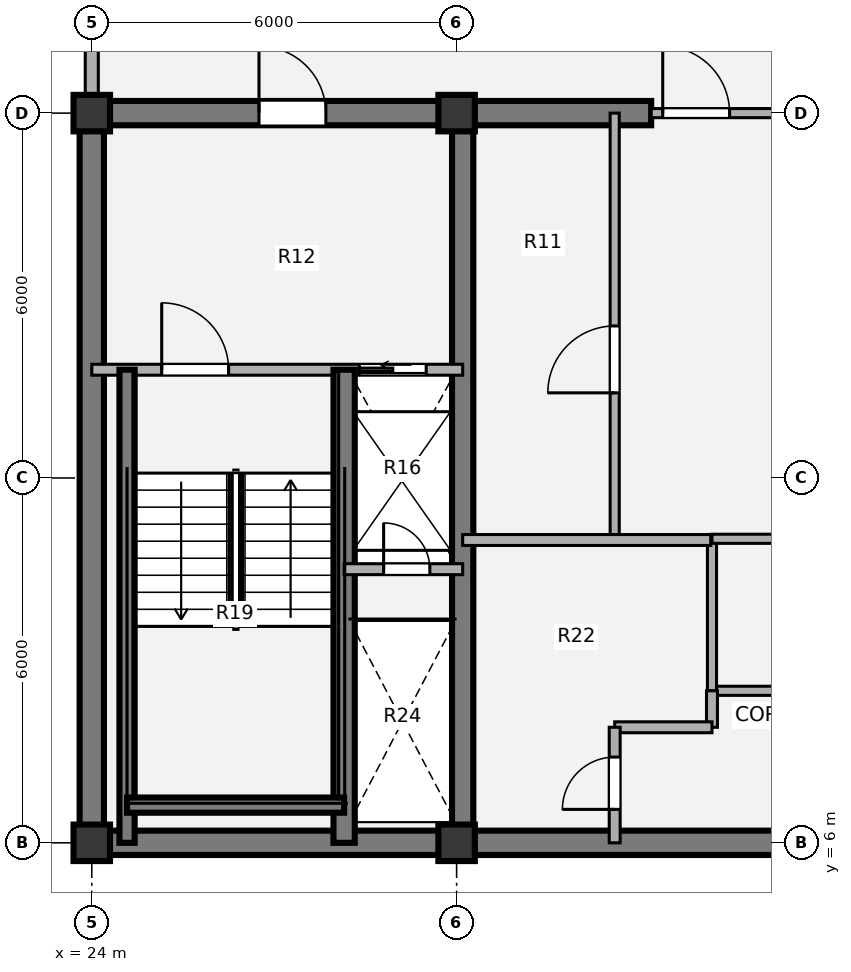
"""IFC4 building model, lengths in metres.
Left out: names, types, materials, properties, quantities, classifications, styles, units other than length and angle.
Written with IfcOpenShell. Run it as: python <this file> out.ifc"""

import sys

from ifc_helpers import new_model, si_unit, direction, frame, frame_2d, origin, origin_2d, place, context, subcontext, project, spatial, rectangle, extrude, source, transform, mapped, element, fill, save


model = new_model("IFC4")
c1 = context("Model", 3, precision=1e-05, world=origin(), true_north=direction((0.0, 1.0)))
c2 = subcontext(c1, "Body", "Model", "MODEL_VIEW")
j1 = project(units=[si_unit("LENGTHUNIT", "METRE"), si_unit("PLANEANGLEUNIT", "RADIAN")], contexts=[c1])
p1 = place(None, origin())
s1 = spatial("IfcSite", under=j1, at=p1, CompositionType="ELEMENT")
p2 = place(p1, origin())
s2 = spatial("IfcBuilding", under=s1, at=p2, CompositionType="ELEMENT")
p3 = place(p2, frame((0.0, 0.0, 253.26)))
s3 = spatial("IfcBuildingStorey", under=s2, at=p3, CompositionType="ELEMENT", Elevation=253.26)
m1 = source(origin(), c2, "Body", "SweptSolid", [
    extrude(rectangle(XDim=0.6, YDim=0.6, at=origin_2d()), origin(), (0.0, 0.0, 1.0), 3.78),
])
for number, where, z_axis, x_axis in (
    (1, (24.0, 6.0, 0.0), (0.0, 0.0, 1.0), (1.0, 0.0, 0.0)),
    (2, (30.0, 6.0, 0.0), (0.0, 0.0, 1.0), (1.0, 0.0, 0.0)),
    (3, (24.0, 18.0, 0.0), (0.0, 0.0, 1.0), (1.0, 0.0, 0.0)),
    (4, (30.0, 18.0, 0.0), (0.0, 0.0, 1.0), (1.0, 0.0, 0.0)),
):
    element("IfcColumn", number, at=place(p3, frame(where, z_axis=z_axis, x_axis=x_axis)), inside=s3, PredefinedType="COLUMN", context=c2, shape_type="MappedRepresentation", body=[
        mapped(m1, transform((0.0, 0.0, 0.0), x_axis=(1.0, 0.0, 0.0), y_axis=(0.0, 1.0, 0.0), z_axis=(0.0, 0.0, 1.0), scale=1.0)),
    ])
p4 = place(p3, frame((48.2, 6.0, 0.0), z_axis=(0.0, 0.0, 1.0), x_axis=(-1.0, 0.0, 0.0)))
e5 = element("IfcWall", 5, at=p4, inside=s3, PredefinedType="SHEAR", context=c2, shape_type="SweptSolid", body=[
    extrude(rectangle(XDim=24.4, YDim=0.4, at=frame_2d((12.2, 0.0))), origin(), (0.0, 0.0, 1.0), 3.78),
])
p5 = place(p3, frame((24.0, 6.0, 0.0), z_axis=(0.0, 0.0, 1.0), x_axis=(0.0, 1.0, 0.0)))
e6 = element("IfcWall", 6, at=p5, inside=s3, PredefinedType="SHEAR", context=c2, shape_type="SweptSolid", body=[
    extrude(rectangle(XDim=12.0, YDim=0.4, at=frame_2d((6.0, 0.0))), origin(), (0.0, 0.0, 1.0), 3.78),
])
p6 = place(p3, frame((23.8, 18.0, 0.0), z_axis=(0.0, 0.0, 1.0), x_axis=(1.0, 0.0, 0.0)))
e7 = element("IfcWall", 7, at=p6, inside=s3, PredefinedType="SHEAR", context=c2, shape_type="SweptSolid", body=[
    extrude(rectangle(XDim=9.4, YDim=0.4, at=frame_2d((4.7, 0.0))), origin(), (0.0, 0.0, 1.0), 3.78),
])
p7 = place(p6, frame((2.95, 0.0, 0.0)))
e8 = element("IfcOpeningElement", 8, at=p7, cuts=e7, PredefinedType="OPENING", context=c2, shape_type="SweptSolid", body=[
    extrude(rectangle(XDim=1.1, YDim=2.1, at=origin_2d()), frame((0.55, 0.21, 1.05), z_axis=(0.0, -1.0, 0.0), x_axis=(1.0, 0.0, 0.0)), (0.0, 0.0, 1.0), 0.42),
])
p8 = place(p3, frame((30.1, 6.0, 0.0), z_axis=(0.0, 0.0, 1.0), x_axis=(0.0, 1.0, 0.0)))
e9 = element("IfcWall", 9, at=p8, inside=s3, PredefinedType="SHEAR", context=c2, shape_type="SweptSolid", body=[
    extrude(rectangle(XDim=12.0, YDim=0.35, at=frame_2d((6.0, 0.0))), origin(), (0.0, 0.0, 1.0), 3.78),
])
p9 = place(p3, frame((24.0, 18.28, 0.0), z_axis=(0.0, 0.0, 1.0), x_axis=(0.0, 1.0, 0.0)))
e10 = element("IfcWall", 10, at=p9, inside=s3, PredefinedType="SOLIDWALL", context=c2, shape_type="SweptSolid", body=[
    extrude(rectangle(XDim=2.77, YDim=0.215, at=frame_2d((1.385, 0.0))), origin(), (0.0, 0.0, 1.0), 2.718),
])
p10 = place(p3, frame((32.6, 11.0, 0.0), z_axis=(0.0, 0.0, 1.0), x_axis=(0.0, 1.0, 0.0)))
e11 = element("IfcWall", 11, at=p10, inside=s3, PredefinedType="PARTITIONING", context=c2, shape_type="SweptSolid", body=[
    extrude(rectangle(XDim=7.0, YDim=0.15, at=frame_2d((3.5, 0.0))), origin(), (0.0, 0.0, 1.0), 3.5),
])
p11 = place(p10, frame((2.4, 0.0, 0.0)))
e12 = element("IfcOpeningElement", 12, at=p11, cuts=e11, PredefinedType="OPENING", context=c2, shape_type="SweptSolid", body=[
    extrude(rectangle(XDim=1.1, YDim=2.1, at=origin_2d()), frame((0.55, 0.085, 1.05), z_axis=(0.0, -1.0, 0.0), x_axis=(1.0, 0.0, 0.0)), (0.0, 0.0, 1.0), 0.17),
])
p12 = place(p3, frame((34.2, 8.5, 0.0), z_axis=(0.0, 0.0, 1.0), x_axis=(1.0, 0.0, 0.0)))
e13 = element("IfcWall", 13, at=p12, inside=s3, PredefinedType="PARTITIONING", context=c2, shape_type="SweptSolid", body=[
    extrude(rectangle(XDim=5.15, YDim=0.15, at=frame_2d((2.575, 0.0))), origin(), (0.0, 0.0, 1.0), 3.5),
])
p13 = place(p3, frame((34.2, 8.5, 0.0), z_axis=(0.0, 0.0, 1.0), x_axis=(0.0, 1.0, 0.0)))
e14 = element("IfcWall", 14, at=p13, inside=s3, PredefinedType="PARTITIONING", context=c2, shape_type="SweptSolid", body=[
    extrude(rectangle(XDim=2.5, YDim=0.15, at=frame_2d((1.25, 0.0))), origin(), (0.0, 0.0, 1.0), 3.5),
])
p14 = place(p3, frame((34.2, 11.0, 0.0), z_axis=(0.0, 0.0, 1.0), x_axis=(1.0, 0.0, 0.0)))
e15 = element("IfcWall", 15, at=p14, inside=s3, PredefinedType="PARTITIONING", context=c2, shape_type="SweptSolid", body=[
    extrude(rectangle(XDim=5.15, YDim=0.15, at=frame_2d((2.575, 0.0))), origin(), (0.0, 0.0, 1.0), 3.5),
])
p15 = place(p14, frame((2.0, 0.0, 0.0)))
e16 = element("IfcOpeningElement", 16, at=p15, cuts=e15, PredefinedType="OPENING", context=c2, shape_type="SweptSolid", body=[
    extrude(rectangle(XDim=1.1, YDim=2.1, at=origin_2d()), frame((0.55, 0.085, 1.05), z_axis=(0.0, -1.0, 0.0), x_axis=(1.0, 0.0, 0.0)), (0.0, 0.0, 1.0), 0.17),
])
p16 = place(p3, frame((30.1, 10.98, 0.0), z_axis=(0.0, 0.0, 1.0), x_axis=(1.0, 0.0, 0.0)))
e17 = element("IfcWall", 17, at=p16, inside=s3, PredefinedType="PARTITIONING", context=c2, shape_type="SweptSolid", body=[
    extrude(rectangle(XDim=4.08, YDim=0.18, at=frame_2d((2.04, 0.0))), origin(), (0.0, 0.0, 1.0), 3.5),
])
p17 = place(p3, frame((34.2, 7.9, 0.0), z_axis=(0.0, 0.0, 1.0), x_axis=(0.0, 1.0, 0.0)))
e18 = element("IfcWall", 18, at=p17, inside=s3, PredefinedType="PARTITIONING", context=c2, shape_type="SweptSolid", body=[
    extrude(rectangle(XDim=0.6, YDim=0.18, at=frame_2d((0.3, 0.0))), origin(), (0.0, 0.0, 1.0), 3.5),
])
p18 = place(p3, frame((32.6, 7.9, 0.0), z_axis=(0.0, 0.0, 1.0), x_axis=(1.0, 0.0, 0.0)))
e19 = element("IfcWall", 19, at=p18, inside=s3, PredefinedType="PARTITIONING", context=c2, shape_type="SweptSolid", body=[
    extrude(rectangle(XDim=1.6, YDim=0.18, at=frame_2d((0.8, 0.0))), origin(), (0.0, 0.0, 1.0), 3.5),
])
p19 = place(p3, frame((32.6, 6.0, 0.0), z_axis=(0.0, 0.0, 1.0), x_axis=(0.0, 1.0, 0.0)))
e20 = element("IfcWall", 20, at=p19, inside=s3, PredefinedType="PARTITIONING", context=c2, shape_type="SweptSolid", body=[
    extrude(rectangle(XDim=1.9, YDim=0.18, at=frame_2d((0.95, 0.0))), origin(), (0.0, 0.0, 1.0), 3.5),
])
p20 = place(p19, frame((0.55, 0.0, 0.0)))
e21 = element("IfcOpeningElement", 21, at=p20, cuts=e20, PredefinedType="OPENING", context=c2, shape_type="SweptSolid", body=[
    extrude(rectangle(XDim=0.86, YDim=2.1, at=origin_2d()), frame((0.43, 0.1, 1.05), z_axis=(0.0, -1.0, 0.0), x_axis=(1.0, 0.0, 0.0)), (0.0, 0.0, 1.0), 0.2),
])
p21 = place(p3, frame((33.2, 18.0, 0.0), z_axis=(0.0, 0.0, 1.0), x_axis=(1.0, 0.0, 0.0)))
e22 = element("IfcWall", 22, at=p21, inside=s3, PredefinedType="PARTITIONING", context=c2, shape_type="SweptSolid", body=[
    extrude(rectangle(XDim=5.6, YDim=0.15, at=frame_2d((2.8, 0.0))), origin(), (0.0, 0.0, 1.0), 2.515),
])
p22 = place(p21, frame((0.19, 0.0, 0.0)))
e23 = element("IfcOpeningElement", 23, at=p22, cuts=e22, PredefinedType="OPENING", context=c2, shape_type="SweptSolid", body=[
    extrude(rectangle(XDim=1.1, YDim=2.1, at=origin_2d()), frame((0.55, 0.085, 1.05), z_axis=(0.0, -1.0, 0.0), x_axis=(1.0, 0.0, 0.0)), (0.0, 0.0, 1.0), 0.17),
])
p23 = place(p21, frame((4.31, 0.0, 0.0)))
e24 = element("IfcOpeningElement", 24, at=p23, cuts=e22, PredefinedType="OPENING", context=c2, shape_type="SweptSolid", body=[
    extrude(rectangle(XDim=1.1, YDim=2.1, at=origin_2d()), frame((0.55, 0.085, 1.05), z_axis=(0.0, -1.0, 0.0), x_axis=(1.0, 0.0, 0.0)), (0.0, 0.0, 1.0), 0.17),
])
p24 = place(p3, frame((24.0, 13.78, 0.0), z_axis=(0.0, 0.0, 1.0), x_axis=(1.0, 0.0, 0.0)))
e25 = element("IfcWall", 25, at=p24, inside=s3, PredefinedType="PARTITIONING", context=c2, shape_type="SweptSolid", body=[
    extrude(rectangle(XDim=6.1, YDim=0.18, at=frame_2d((3.05, 0.0))), origin(), (0.0, 0.0, 1.0), 3.5),
])
p25 = place(p24, frame((1.15, 0.0, 0.0)))
e26 = element("IfcOpeningElement", 26, at=p25, cuts=e25, PredefinedType="OPENING", context=c2, shape_type="SweptSolid", body=[
    extrude(rectangle(XDim=1.1, YDim=2.1, at=origin_2d()), frame((0.55, 0.1, 1.05), z_axis=(0.0, -1.0, 0.0), x_axis=(1.0, 0.0, 0.0)), (0.0, 0.0, 1.0), 0.2),
])
p26 = place(p24, frame((4.4, 0.0, 0.0)))
e27 = element("IfcOpeningElement", 27, at=p26, cuts=e25, PredefinedType="OPENING", context=c2, shape_type="SweptSolid", body=[
    extrude(rectangle(XDim=1.1, YDim=2.1, at=origin_2d()), frame((0.55, 0.1, 1.05), z_axis=(0.0, -1.0, 0.0), x_axis=(1.0, 0.0, 0.0)), (0.0, 0.0, 1.0), 0.2),
])
p27 = place(p3, frame((28.15, 6.0, 0.0), z_axis=(0.0, 0.0, 1.0), x_axis=(0.0, 1.0, 0.0)))
e28 = element("IfcWall", 28, at=p27, inside=s3, PredefinedType="SHEAR", context=c2, shape_type="SweptSolid", body=[
    extrude(rectangle(XDim=7.78, YDim=0.35, at=frame_2d((3.89, 0.0))), origin(), (0.0, 0.0, 1.0), 3.85),
])
p28 = place(p3, frame((24.58, 6.0, 0.0), z_axis=(0.0, 0.0, 1.0), x_axis=(0.0, 1.0, 0.0)))
e29 = element("IfcWall", 29, at=p28, inside=s3, PredefinedType="SHEAR", context=c2, shape_type="SweptSolid", body=[
    extrude(rectangle(XDim=7.78, YDim=0.25, at=frame_2d((3.89, 0.0))), origin(), (0.0, 0.0, 1.0), 3.85),
])
p29 = place(p3, frame((24.58, 6.62, 0.0), z_axis=(0.0, 0.0, 1.0), x_axis=(1.0, 0.0, 0.0)))
e30 = element("IfcWall", 30, at=p29, inside=s3, PredefinedType="SHEAR", context=c2, shape_type="SweptSolid", body=[
    extrude(rectangle(XDim=3.57, YDim=0.25, at=frame_2d((1.785, 0.0))), origin(), (0.0, 0.0, 1.0), 3.85),
])
p30 = place(p3, frame((28.15, 10.5, 0.0), z_axis=(0.0, 0.0, 1.0), x_axis=(1.0, 0.0, 0.0)))
e31 = element("IfcWall", 31, at=p30, inside=s3, PredefinedType="PARTITIONING", context=c2, shape_type="SweptSolid", body=[
    extrude(rectangle(XDim=1.95, YDim=0.18, at=frame_2d((0.975, 0.0))), origin(), (0.0, 0.0, 1.0), 3.5),
])
p31 = place(p30, frame((0.65, 0.0, 0.0)))
e32 = element("IfcOpeningElement", 32, at=p31, cuts=e31, PredefinedType="OPENING", context=c2, shape_type="SweptSolid", body=[
    extrude(rectangle(XDim=0.76, YDim=2.05, at=origin_2d()), frame((0.38, 0.1, 1.025), z_axis=(0.0, -1.0, 0.0), x_axis=(1.0, 0.0, 0.0)), (0.0, 0.0, 1.0), 0.2),
])
m2 = source(origin(), c2, "Body", "SweptSolid", [
    extrude(rectangle(XDim=1.1, YDim=2.1, at=origin_2d()), frame((0.55, 0.025, 1.05), z_axis=(0.0, -1.0, 0.0), x_axis=(1.0, 0.0, 0.0)), (0.0, 0.0, 1.0), 0.05),
])
p32 = place(p11, origin())
e33 = element("IfcDoor", 33, at=p32, inside=s3, OperationType="SINGLE_SWING_LEFT", PredefinedType="DOOR", context=c2, shape_type="MappedRepresentation", body=[
    mapped(m2, transform((0.0, 0.0, 0.0), x_axis=(1.0, 0.0, 0.0), y_axis=(0.0, 1.0, 0.0), z_axis=(0.0, 0.0, 1.0), scale=1.0)),
])
fill(e12, e33)
m3 = source(origin(), c2, "Body", "SweptSolid", [
    extrude(rectangle(XDim=0.86, YDim=2.1, at=origin_2d()), frame((0.43, 0.025, 1.05), z_axis=(0.0, -1.0, 0.0), x_axis=(1.0, 0.0, 0.0)), (0.0, 0.0, 1.0), 0.05),
])
p33 = place(p20, origin())
e34 = element("IfcDoor", 34, at=p33, inside=s3, OperationType="SINGLE_SWING_LEFT", PredefinedType="DOOR", context=c2, shape_type="MappedRepresentation", body=[
    mapped(m3, transform((0.0, 0.0, 0.0), x_axis=(1.0, 0.0, 0.0), y_axis=(0.0, 1.0, 0.0), z_axis=(0.0, 0.0, 1.0), scale=1.0)),
])
fill(e21, e34)
m4 = source(origin(), c2, "Body", "SweptSolid", [
    extrude(rectangle(XDim=1.1, YDim=2.1, at=origin_2d()), frame((0.55, 0.025, 1.05), z_axis=(0.0, -1.0, 0.0), x_axis=(1.0, 0.0, 0.0)), (0.0, 0.0, 1.0), 0.05),
])
p34 = place(p22, origin())
e35 = element("IfcDoor", 35, at=p34, inside=s3, OperationType="SINGLE_SWING_LEFT", PredefinedType="DOOR", context=c2, shape_type="MappedRepresentation", body=[
    mapped(m4, transform((0.0, 0.0, 0.0), x_axis=(1.0, 0.0, 0.0), y_axis=(0.0, 1.0, 0.0), z_axis=(0.0, 0.0, 1.0), scale=1.0)),
])
fill(e23, e35)
m5 = source(origin(), c2, "Body", "SweptSolid", [
    extrude(rectangle(XDim=1.1, YDim=2.1, at=origin_2d()), frame((0.55, 0.025, 1.05), z_axis=(0.0, -1.0, 0.0), x_axis=(1.0, 0.0, 0.0)), (0.0, 0.0, 1.0), 0.05),
])
p35 = place(p25, origin())
e36 = element("IfcDoor", 36, at=p35, inside=s3, OperationType="SINGLE_SWING_LEFT", PredefinedType="DOOR", context=c2, shape_type="MappedRepresentation", body=[
    mapped(m5, transform((0.0, 0.0, 0.0), x_axis=(1.0, 0.0, 0.0), y_axis=(0.0, 1.0, 0.0), z_axis=(0.0, 0.0, 1.0), scale=1.0)),
])
fill(e26, e36)
m6 = source(origin(), c2, "Body", "SweptSolid", [
    extrude(rectangle(XDim=1.1, YDim=2.1, at=origin_2d()), frame((0.55, 0.025, 1.05), z_axis=(0.0, -1.0, 0.0), x_axis=(1.0, 0.0, 0.0)), (0.0, 0.0, 1.0), 0.05),
])
p36 = place(p26, origin())
e37 = element("IfcDoor", 37, at=p36, inside=s3, OperationType="SLIDING_TO_LEFT", PredefinedType="DOOR", context=c2, shape_type="MappedRepresentation", body=[
    mapped(m6, transform((0.0, 0.0, 0.0), x_axis=(1.0, 0.0, 0.0), y_axis=(0.0, 1.0, 0.0), z_axis=(0.0, 0.0, 1.0), scale=1.0)),
])
fill(e27, e37)
m7 = source(origin(), c2, "Body", "SweptSolid", [
    extrude(rectangle(XDim=0.76, YDim=2.05, at=origin_2d()), frame((0.38, 0.025, 1.025), z_axis=(0.0, -1.0, 0.0), x_axis=(1.0, 0.0, 0.0)), (0.0, 0.0, 1.0), 0.05),
])
p37 = place(p31, origin())
e38 = element("IfcDoor", 38, at=p37, inside=s3, OperationType="SINGLE_SWING_LEFT", PredefinedType="DOOR", context=c2, shape_type="MappedRepresentation", body=[
    mapped(m7, transform((0.0, 0.0, 0.0), x_axis=(1.0, 0.0, 0.0), y_axis=(0.0, 1.0, 0.0), z_axis=(0.0, 0.0, 1.0), scale=1.0)),
])
fill(e32, e38)
p38 = place(p7, origin())
e39 = element("IfcDoor", 39, at=p38, inside=s3, OperationType="SINGLE_SWING_LEFT", PredefinedType="DOOR", context=c2, shape_type="MappedRepresentation", body=[
    mapped(m4, transform((0.0, 0.0, 0.0), x_axis=(1.0, 0.0, 0.0), y_axis=(0.0, 1.0, 0.0), z_axis=(0.0, 0.0, 1.0), scale=1.0)),
])
fill(e8, e39)
save(model, sys.argv[1])
